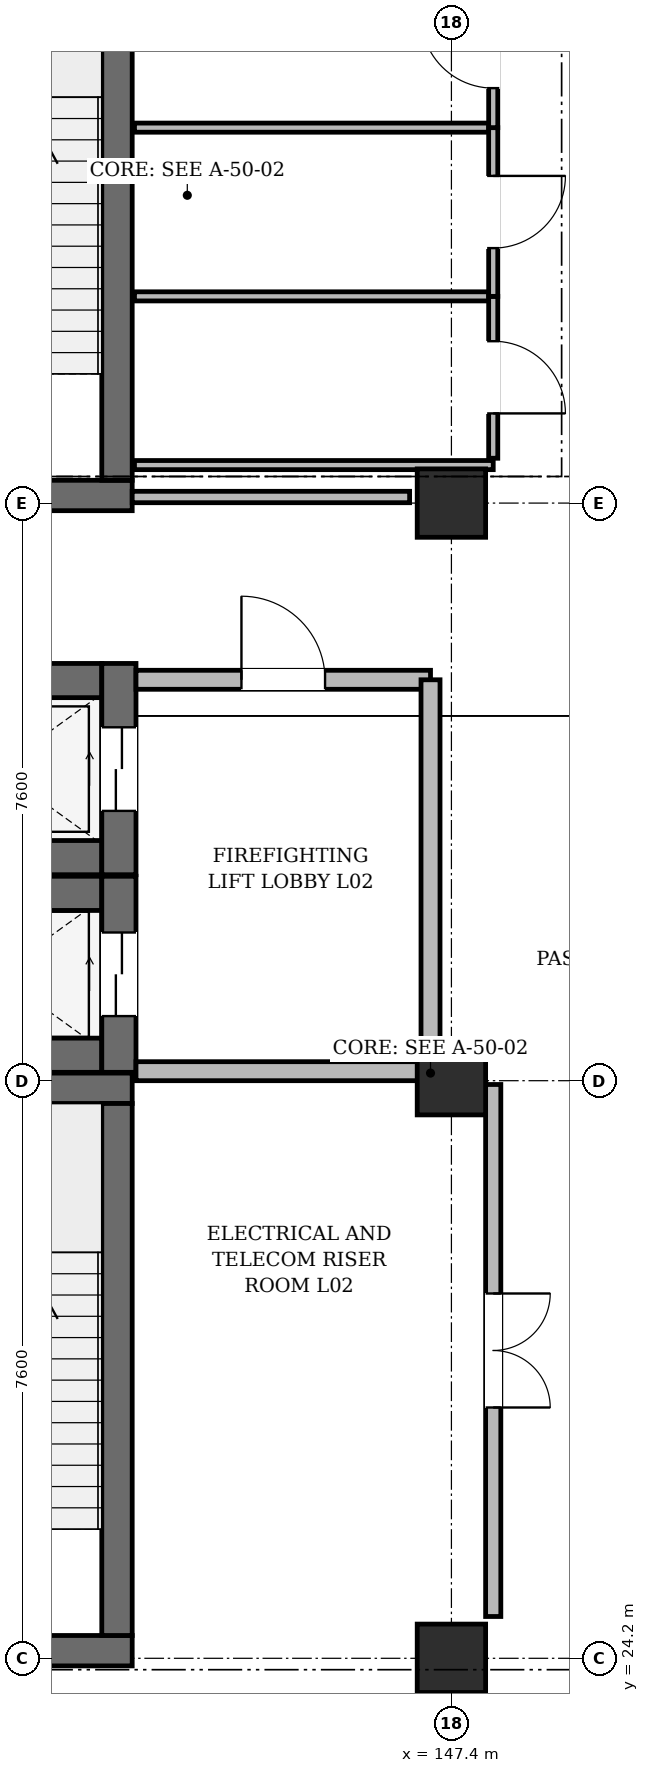
"""IFC4 building model, lengths in metres.
Left out: names, types, materials, properties, quantities, classifications, styles, units other than length and angle.
Written with IfcOpenShell. Run it as: python <this file> out.ifc"""

import sys

from ifc_helpers import new_model, si_unit, direction, frame, frame_2d, origin, origin_2d, place, context, subcontext, project, spatial, rectangle, extrude, element, fill, save


model = new_model("IFC4")
c1 = context("Model", 3, precision=1e-05, world=origin(), true_north=direction((0.0, 1.0)))
c2 = subcontext(c1, "Body", "Model", "MODEL_VIEW")
j1 = project(units=[si_unit("LENGTHUNIT", "METRE"), si_unit("PLANEANGLEUNIT", "RADIAN")], contexts=[c1])
p1 = place(None, origin())
s1 = spatial("IfcSite", under=j1, at=p1, CompositionType="ELEMENT")
p2 = place(p1, origin())
s2 = spatial("IfcBuilding", under=s1, at=p2, CompositionType="ELEMENT")
p3 = place(p2, frame((0.0, 0.0, 10.2)))
s3 = spatial("IfcBuildingStorey", under=s2, at=p3, CompositionType="ELEMENT", Elevation=10.2)
for number, where, z_axis, x_axis in (
    (1, (147.4, 24.2, 0.0), (0.0, 0.0, 1.0), (1.0, 0.0, 0.0)),
    (2, (147.4, 31.8, 0.0), (0.0, 0.0, 1.0), (1.0, 0.0, 0.0)),
    (3, (147.4, 39.4, 0.0), (0.0, 0.0, 1.0), (1.0, 0.0, 0.0)),
):
    element("IfcColumn", number, at=place(p3, frame(where, z_axis=z_axis, x_axis=x_axis)), inside=s3, PredefinedType="COLUMN", context=c2, shape_type="SweptSolid", body=[
        extrude(rectangle(XDim=0.9, YDim=0.9, at=origin_2d()), origin(), (0.0, 0.0, 1.0), 4.51),
    ])
p4 = place(p3, frame((139.4, 24.3, 0.0), z_axis=(0.0, 0.0, 1.0), x_axis=(1.0, 0.0, 0.0)))
e4 = element("IfcWall", 4, at=p4, inside=s3, PredefinedType="SHEAR", context=c2, shape_type="SweptSolid", body=[
    extrude(rectangle(XDim=3.8, YDim=0.4, at=frame_2d((1.9, 0.0))), origin(), (0.0, 0.0, 1.0), 4.51),
])
p5 = place(p4, frame((1.3, 0.0, 0.0)))
e5 = element("IfcOpeningElement", 5, at=p5, cuts=e4, PredefinedType="OPENING", context=c2, shape_type="SweptSolid", body=[
    extrude(rectangle(XDim=1.2, YDim=2.2, at=frame_2d((0.6, 1.1))), frame((0.0, 0.212, 0.0), z_axis=(0.0, -1.0, 0.0), x_axis=(1.0, 0.0, 0.0)), (0.0, 0.0, 1.0), 0.424),
])
p6 = place(p3, frame((139.4, 31.7, 0.0), z_axis=(0.0, 0.0, 1.0), x_axis=(1.0, 0.0, 0.0)))
e6 = element("IfcWall", 6, at=p6, inside=s3, PredefinedType="SHEAR", context=c2, shape_type="SweptSolid", body=[
    extrude(rectangle(XDim=3.8, YDim=0.4, at=frame_2d((1.9, 0.0))), origin(), (0.0, 0.0, 1.0), 4.51),
])
p7 = place(p3, frame((143.0, 24.5, 0.0), z_axis=(0.0, 0.0, 1.0), x_axis=(0.0, 1.0, 0.0)))
e7 = element("IfcWall", 7, at=p7, inside=s3, PredefinedType="SHEAR", context=c2, shape_type="SweptSolid", body=[
    extrude(rectangle(XDim=7.0, YDim=0.4, at=frame_2d((3.5, 0.0))), origin(), (0.0, 0.0, 1.0), 4.51),
])
p8 = place(p3, frame((139.4, 39.5, 0.0), z_axis=(0.0, 0.0, 1.0), x_axis=(1.0, 0.0, 0.0)))
e8 = element("IfcWall", 8, at=p8, inside=s3, PredefinedType="SHEAR", context=c2, shape_type="SweptSolid", body=[
    extrude(rectangle(XDim=3.8, YDim=0.4, at=frame_2d((1.9, 0.0))), origin(), (0.0, 0.0, 1.0), 4.51),
])
p9 = place(p8, frame((1.3, 0.0, 0.0)))
e9 = element("IfcOpeningElement", 9, at=p9, cuts=e8, PredefinedType="OPENING", context=c2, shape_type="SweptSolid", body=[
    extrude(rectangle(XDim=1.2, YDim=2.2, at=frame_2d((0.6, 1.1))), frame((0.0, 0.212, 0.0), z_axis=(0.0, -1.0, 0.0), x_axis=(1.0, 0.0, 0.0)), (0.0, 0.0, 1.0), 0.424),
])
p10 = place(p3, frame((143.0, 39.7, 0.0), z_axis=(0.0, 0.0, 1.0), x_axis=(0.0, 1.0, 0.0)))
e10 = element("IfcWall", 10, at=p10, inside=s3, PredefinedType="SHEAR", context=c2, shape_type="SweptSolid", body=[
    extrude(rectangle(XDim=7.0, YDim=0.4, at=frame_2d((3.5, 0.0))), origin(), (0.0, 0.0, 1.0), 4.51),
])
for number, where, z_axis, x_axis in (
    (11, (140.06, 32.135, 0.0), (0.0, 0.0, 1.0), (1.0, 0.0, 0.0)),
    (12, (140.06, 34.265, 0.0), (0.0, 0.0, 1.0), (1.0, 0.0, 0.0)),
):
    element("IfcWall", number, at=place(p3, frame(where, z_axis=z_axis, x_axis=x_axis)), inside=s3, PredefinedType="SHEAR", context=c2, shape_type="SweptSolid", body=[
        extrude(rectangle(XDim=2.74, YDim=0.45, at=frame_2d((1.37, 0.0))), origin(), (0.0, 0.0, 1.0), 4.51),
    ])
p11 = place(p3, frame((143.025, 31.91, 0.0), z_axis=(0.0, 0.0, 1.0), x_axis=(0.0, 1.0, 0.0)))
e13 = element("IfcWall", 13, at=p11, inside=s3, PredefinedType="SHEAR", context=c2, shape_type="SweptSolid", body=[
    extrude(rectangle(XDim=2.58, YDim=0.45, at=frame_2d((1.29, 0.0))), origin(), (0.0, 0.0, 1.0), 4.51),
])
p12 = place(p11, frame((0.74, 0.0, 0.0)))
e14 = element("IfcOpeningElement", 14, at=p12, cuts=e13, PredefinedType="OPENING", context=c2, shape_type="SweptSolid", body=[
    extrude(rectangle(XDim=1.1, YDim=2.2, at=frame_2d((0.55, 1.1))), frame((0.0, 0.237, 0.0), z_axis=(0.0, -1.0, 0.0), x_axis=(1.0, 0.0, 0.0)), (0.0, 0.0, 1.0), 0.474),
])
for number, where, z_axis, x_axis in (
    (15, (140.06, 34.735, 0.0), (0.0, 0.0, 1.0), (1.0, 0.0, 0.0)),
    (16, (140.06, 37.065, 0.0), (0.0, 0.0, 1.0), (1.0, 0.0, 0.0)),
):
    element("IfcWall", number, at=place(p3, frame(where, z_axis=z_axis, x_axis=x_axis)), inside=s3, PredefinedType="SHEAR", context=c2, shape_type="SweptSolid", body=[
        extrude(rectangle(XDim=2.74, YDim=0.45, at=frame_2d((1.37, 0.0))), origin(), (0.0, 0.0, 1.0), 4.51),
    ])
p13 = place(p3, frame((143.025, 34.51, 0.0), z_axis=(0.0, 0.0, 1.0), x_axis=(0.0, 1.0, 0.0)))
e17 = element("IfcWall", 17, at=p13, inside=s3, PredefinedType="SHEAR", context=c2, shape_type="SweptSolid", body=[
    extrude(rectangle(XDim=2.78, YDim=0.45, at=frame_2d((1.39, 0.0))), origin(), (0.0, 0.0, 1.0), 4.51),
])
p14 = place(p13, frame((0.84, 0.0, 0.0)))
e18 = element("IfcOpeningElement", 18, at=p14, cuts=e17, PredefinedType="OPENING", context=c2, shape_type="SweptSolid", body=[
    extrude(rectangle(XDim=1.1, YDim=2.2, at=frame_2d((0.55, 1.1))), frame((0.0, 0.237, 0.0), z_axis=(0.0, -1.0, 0.0), x_axis=(1.0, 0.0, 0.0)), (0.0, 0.0, 1.0), 0.474),
])
p15 = place(p3, frame((143.25, 37.075, 0.0), z_axis=(0.0, 0.0, 1.0), x_axis=(1.0, 0.0, 0.0)))
e19 = element("IfcWall", 19, at=p15, inside=s3, PredefinedType="SOLIDWALL", context=c2, shape_type="SweptSolid", body=[
    extrude(rectangle(XDim=3.875, YDim=0.25, at=frame_2d((1.938, 0.0))), origin(), (0.0, 0.0, 1.0), 4.405),
])
p16 = place(p15, frame((1.387, 0.0, 0.0)))
e20 = element("IfcOpeningElement", 20, at=p16, cuts=e19, PredefinedType="OPENING", context=c2, shape_type="SweptSolid", body=[
    extrude(rectangle(XDim=1.1, YDim=2.2, at=frame_2d((0.55, 1.1))), frame((0.0, 0.137, 0.0), z_axis=(0.0, -1.0, 0.0), x_axis=(1.0, 0.0, 0.0)), (0.0, 0.0, 1.0), 0.274),
])
p17 = place(p3, frame((143.25, 31.925, 0.0), z_axis=(0.0, 0.0, 1.0), x_axis=(1.0, 0.0, 0.0)))
e21 = element("IfcWall", 21, at=p17, inside=s3, PredefinedType="SOLIDWALL", context=c2, shape_type="SweptSolid", body=[
    extrude(rectangle(XDim=3.875, YDim=0.25, at=frame_2d((1.938, 0.0))), origin(), (0.0, 0.0, 1.0), 3.795),
])
p18 = place(p3, frame((147.125, 31.925, 0.0), z_axis=(0.0, 0.0, 1.0), x_axis=(0.0, 1.0, 0.0)))
e22 = element("IfcWall", 22, at=p18, inside=s3, PredefinedType="SOLIDWALL", context=c2, shape_type="SweptSolid", body=[
    extrude(rectangle(XDim=5.15, YDim=0.25, at=frame_2d((2.575, 0.0))), origin(), (0.0, 0.0, 1.0), 3.795),
])
p19 = place(p3, frame((143.23, 39.9, 0.0), z_axis=(0.0, 0.0, 1.0), x_axis=(1.0, 0.0, 0.0)))
e23 = element("IfcWall", 23, at=p19, inside=s3, PredefinedType="PARTITIONING", context=c2, shape_type="SweptSolid", body=[
    extrude(rectangle(XDim=4.72, YDim=0.12, at=frame_2d((2.36, 0.0))), origin(), (0.0, 0.0, 1.0), 4.405),
])
p20 = place(p3, frame((147.95, 31.75, 0.0), z_axis=(0.0, 0.0, 1.0), x_axis=(0.0, -1.0, 0.0)))
e24 = element("IfcWall", 24, at=p20, inside=s3, PredefinedType="PARTITIONING", context=c2, shape_type="SweptSolid", body=[
    extrude(rectangle(XDim=7.0, YDim=0.2, at=frame_2d((3.5, 0.0))), origin(), (0.0, 0.0, 1.0), 4.405),
])
p21 = place(p20, frame((2.75, 0.0, 0.0)))
e25 = element("IfcOpeningElement", 25, at=p21, cuts=e24, PredefinedType="OPENING", context=c2, shape_type="SweptSolid", body=[
    extrude(rectangle(XDim=1.5, YDim=2.2, at=frame_2d((0.75, 1.1))), frame((0.0, 0.112, 0.0), z_axis=(0.0, -1.0, 0.0), x_axis=(1.0, 0.0, 0.0)), (0.0, 0.0, 1.0), 0.224),
])
p22 = place(p3, frame((143.23, 42.12, 0.0), z_axis=(0.0, 0.0, 1.0), x_axis=(1.0, 0.0, 0.0)))
e26 = element("IfcWall", 26, at=p22, inside=s3, PredefinedType="PARTITIONING", context=c2, shape_type="SweptSolid", body=[
    extrude(rectangle(XDim=4.72, YDim=0.12, at=frame_2d((2.36, 0.0))), origin(), (0.0, 0.0, 1.0), 3.985),
])
p23 = place(p3, frame((147.95, 42.12, 0.0), z_axis=(0.0, 0.0, 1.0), x_axis=(0.0, -1.0, 0.0)))
e27 = element("IfcWall", 27, at=p23, inside=s3, PredefinedType="PARTITIONING", context=c2, shape_type="SweptSolid", body=[
    extrude(rectangle(XDim=2.13, YDim=0.12, at=frame_2d((1.065, 0.0))), origin(), (0.0, 0.0, 1.0), 4.405),
])
p24 = place(p23, frame((0.59, 0.0, 0.0)))
e28 = element("IfcOpeningElement", 28, at=p24, cuts=e27, PredefinedType="OPENING", context=c2, shape_type="SweptSolid", body=[
    extrude(rectangle(XDim=0.95, YDim=2.15, at=frame_2d((0.475, 1.075))), frame((0.0, 0.072, 0.0), z_axis=(0.0, -1.0, 0.0), x_axis=(1.0, 0.0, 0.0)), (0.0, 0.0, 1.0), 0.144),
])
p25 = place(p3, frame((143.23, 44.34, 0.0), z_axis=(0.0, 0.0, 1.0), x_axis=(1.0, 0.0, 0.0)))
e29 = element("IfcWall", 29, at=p25, inside=s3, PredefinedType="PARTITIONING", context=c2, shape_type="SweptSolid", body=[
    extrude(rectangle(XDim=4.72, YDim=0.12, at=frame_2d((2.36, 0.0))), origin(), (0.0, 0.0, 1.0), 3.935),
])
p26 = place(p3, frame((147.95, 44.34, 0.0), z_axis=(0.0, 0.0, 1.0), x_axis=(0.0, -1.0, 0.0)))
e30 = element("IfcWall", 30, at=p26, inside=s3, PredefinedType="PARTITIONING", context=c2, shape_type="SweptSolid", body=[
    extrude(rectangle(XDim=2.22, YDim=0.12, at=frame_2d((1.11, 0.0))), origin(), (0.0, 0.0, 1.0), 4.405),
])
p27 = place(p26, frame((0.635, 0.0, 0.0)))
e31 = element("IfcOpeningElement", 31, at=p27, cuts=e30, PredefinedType="OPENING", context=c2, shape_type="SweptSolid", body=[
    extrude(rectangle(XDim=0.95, YDim=2.15, at=frame_2d((0.475, 1.075))), frame((0.0, 0.072, 0.0), z_axis=(0.0, -1.0, 0.0), x_axis=(1.0, 0.0, 0.0)), (0.0, 0.0, 1.0), 0.144),
])
p28 = place(p3, frame((147.95, 46.33, 0.0), z_axis=(0.0, 0.0, 1.0), x_axis=(0.0, -1.0, 0.0)))
e32 = element("IfcWall", 32, at=p28, inside=s3, PredefinedType="PARTITIONING", context=c2, shape_type="SweptSolid", body=[
    extrude(rectangle(XDim=1.99, YDim=0.12, at=frame_2d((0.995, 0.0))), origin(), (0.0, 0.0, 1.0), 4.405),
])
p29 = place(p28, frame((0.52, 0.0, 0.0)))
e33 = element("IfcOpeningElement", 33, at=p29, cuts=e32, PredefinedType="OPENING", context=c2, shape_type="SweptSolid", body=[
    extrude(rectangle(XDim=0.95, YDim=2.15, at=frame_2d((0.475, 1.075))), frame((0.0, 0.072, 0.0), z_axis=(0.0, -1.0, 0.0), x_axis=(1.0, 0.0, 0.0)), (0.0, 0.0, 1.0), 0.144),
])
p30 = place(p3, frame((143.2, 39.48, 0.0), z_axis=(0.0, 0.0, 1.0), x_axis=(1.0, 0.0, 0.0)))
e34 = element("IfcWall", 34, at=p30, inside=s3, PredefinedType="PARTITIONING", context=c2, shape_type="SweptSolid", body=[
    extrude(rectangle(XDim=3.65, YDim=0.15, at=frame_2d((1.825, 0.0))), origin(), (0.0, 0.0, 1.0), 3.795),
])
p31 = place(p12, origin())
e35 = element("IfcDoor", 35, at=p31, inside=s3, OperationType="DOUBLE_DOOR_SLIDING", PredefinedType="DOOR", context=c2, shape_type="SweptSolid", body=[
    extrude(rectangle(XDim=1.1, YDim=2.2, at=frame_2d((0.55, 1.1))), frame((0.0, 0.025, 0.0), z_axis=(0.0, -1.0, 0.0), x_axis=(1.0, 0.0, 0.0)), (0.0, 0.0, 1.0), 0.05),
])
fill(e14, e35)
p32 = place(p14, origin())
e36 = element("IfcDoor", 36, at=p32, inside=s3, OperationType="DOUBLE_DOOR_SLIDING", PredefinedType="DOOR", context=c2, shape_type="SweptSolid", body=[
    extrude(rectangle(XDim=1.1, YDim=2.2, at=frame_2d((0.55, 1.1))), frame((0.0, 0.025, 0.0), z_axis=(0.0, -1.0, 0.0), x_axis=(1.0, 0.0, 0.0)), (0.0, 0.0, 1.0), 0.05),
])
fill(e18, e36)
p33 = place(p16, origin())
e37 = element("IfcDoor", 37, at=p33, inside=s3, OperationType="SINGLE_SWING_LEFT", PredefinedType="DOOR", context=c2, shape_type="SweptSolid", body=[
    extrude(rectangle(XDim=1.1, YDim=2.2, at=frame_2d((0.55, 1.1))), frame((0.0, 0.025, 0.0), z_axis=(0.0, -1.0, 0.0), x_axis=(1.0, 0.0, 0.0)), (0.0, 0.0, 1.0), 0.05),
])
fill(e20, e37)
p34 = place(p21, origin())
e38 = element("IfcDoor", 38, at=p34, inside=s3, OperationType="DOUBLE_DOOR_SINGLE_SWING", PredefinedType="DOOR", context=c2, shape_type="SweptSolid", body=[
    extrude(rectangle(XDim=1.5, YDim=2.2, at=frame_2d((0.75, 1.1))), frame((0.0, 0.025, 0.0), z_axis=(0.0, -1.0, 0.0), x_axis=(1.0, 0.0, 0.0)), (0.0, 0.0, 1.0), 0.05),
])
fill(e25, e38)
p35 = place(p24, origin())
e39 = element("IfcDoor", 39, at=p35, inside=s3, OperationType="SINGLE_SWING_RIGHT", PredefinedType="DOOR", context=c2, shape_type="SweptSolid", body=[
    extrude(rectangle(XDim=0.95, YDim=2.15, at=frame_2d((0.475, 1.075))), frame((0.0, 0.025, 0.0), z_axis=(0.0, -1.0, 0.0), x_axis=(1.0, 0.0, 0.0)), (0.0, 0.0, 1.0), 0.05),
])
fill(e28, e39)
p36 = place(p27, origin())
e40 = element("IfcDoor", 40, at=p36, inside=s3, OperationType="SINGLE_SWING_LEFT", PredefinedType="DOOR", context=c2, shape_type="SweptSolid", body=[
    extrude(rectangle(XDim=0.95, YDim=2.15, at=frame_2d((0.475, 1.075))), frame((0.0, 0.025, 0.0), z_axis=(0.0, -1.0, 0.0), x_axis=(1.0, 0.0, 0.0)), (0.0, 0.0, 1.0), 0.05),
])
fill(e31, e40)
p37 = place(p29, frame((0.95, 0.0, 0.0), z_axis=(0.0, 0.0, 1.0), x_axis=(-1.0, 0.0, 0.0)))
e41 = element("IfcDoor", 41, at=p37, inside=s3, OperationType="SINGLE_SWING_RIGHT", PredefinedType="DOOR", context=c2, shape_type="SweptSolid", body=[
    extrude(rectangle(XDim=0.95, YDim=2.15, at=frame_2d((0.475, 1.075))), frame((0.0, 0.025, 0.0), z_axis=(0.0, -1.0, 0.0), x_axis=(1.0, 0.0, 0.0)), (0.0, 0.0, 1.0), 0.05),
])
fill(e33, e41)
save(model, sys.argv[1])
